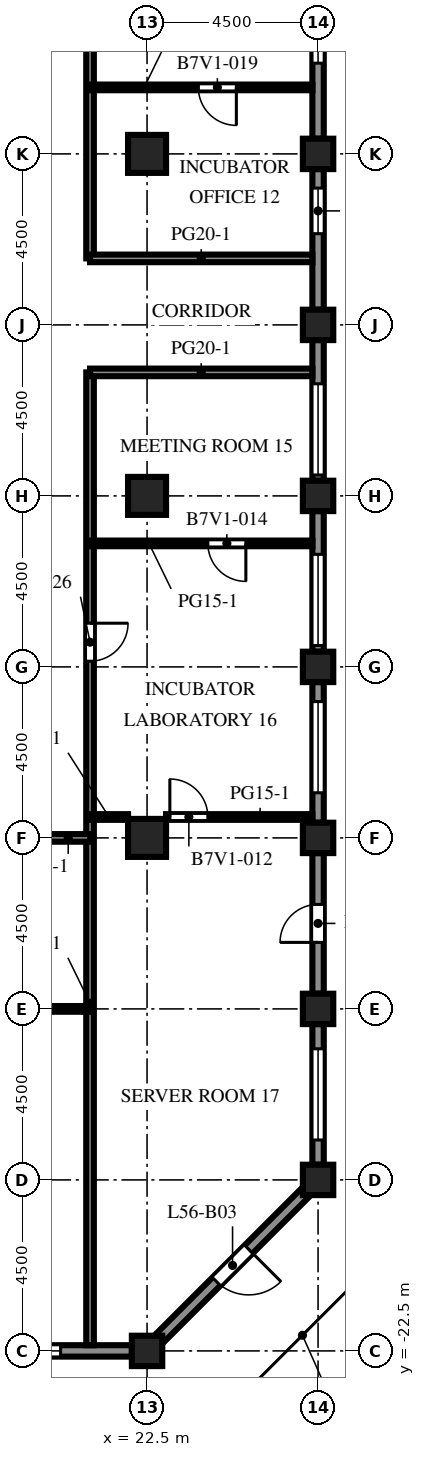
"""IFC4 building model, lengths in metres.
Left out: names, types, materials, properties, quantities, classifications, styles, units other than length and angle.
Written with IfcOpenShell. Run it as: python <this file> out.ifc"""

import sys

from ifc_helpers import new_model, si_unit, direction, frame, frame_2d, origin, origin_2d, place, context, subcontext, project, spatial, rectangle, extrude, element, fill, save


model = new_model("IFC4")
c1 = context("Model", 3, precision=1e-05, world=origin(), true_north=direction((0.0, 1.0)))
c2 = subcontext(c1, "Body", "Model", "MODEL_VIEW")
j1 = project(units=[si_unit("LENGTHUNIT", "METRE"), si_unit("PLANEANGLEUNIT", "RADIAN")], contexts=[c1])
p1 = place(None, origin())
s1 = spatial("IfcSite", under=j1, at=p1, CompositionType="ELEMENT")
p2 = place(p1, origin())
s2 = spatial("IfcBuilding", under=s1, at=p2, CompositionType="ELEMENT")
p3 = place(p2, frame((0.0, 0.0, 248.0)))
s3 = spatial("IfcBuildingStorey", under=s2, at=p3, CompositionType="ELEMENT", Elevation=248.0)
for number, where, z_axis, x_axis in (
    (1, (22.5, -22.5, 0.0), (0.0, 0.0, 1.0), (1.0, 0.0, 0.0)),
    (2, (27.0, -18.0, 0.0), (0.0, 0.0, 1.0), (1.0, 0.0, 0.0)),
    (3, (27.0, -13.5, 0.0), (0.0, 0.0, 1.0), (1.0, 0.0, 0.0)),
    (4, (27.0, -9.0, 0.0), (0.0, 0.0, 1.0), (1.0, 0.0, 0.0)),
    (5, (27.0, -4.5, 0.0), (0.0, 0.0, 1.0), (1.0, 0.0, 0.0)),
    (6, (27.0, 0.0, 0.0), (0.0, 0.0, 1.0), (1.0, 0.0, 0.0)),
    (7, (27.0, 4.5, 0.0), (0.0, 0.0, 1.0), (1.0, 0.0, 0.0)),
    (8, (27.0, 9.0, 0.0), (0.0, 0.0, 1.0), (1.0, 0.0, 0.0)),
):
    element("IfcColumn", number, at=place(p3, frame(where, z_axis=z_axis, x_axis=x_axis)), inside=s3, PredefinedType="COLUMN", context=c2, shape_type="SweptSolid", body=[
        extrude(rectangle(XDim=0.8, YDim=0.8, at=origin_2d()), origin(), (0.0, 0.0, 1.0), 4.1),
    ])
for number, where, z_axis, x_axis in (
    (9, (22.5, -9.0, 0.0), (0.0, 0.0, 1.0), (1.0, 0.0, 0.0)),
    (10, (22.5, 0.0, 0.0), (0.0, 0.0, 1.0), (1.0, 0.0, 0.0)),
    (11, (22.5, 9.0, 0.0), (0.0, 0.0, 1.0), (1.0, 0.0, 0.0)),
):
    element("IfcColumn", number, at=place(p3, frame(where, z_axis=z_axis, x_axis=x_axis)), inside=s3, PredefinedType="COLUMN", context=c2, shape_type="SweptSolid", body=[
        extrude(rectangle(XDim=1.0, YDim=1.0, at=origin_2d()), origin(), (0.0, 0.0, 1.0), 4.1),
    ])
p4 = place(p3, frame((22.1, -22.5, 0.0), z_axis=(0.0, 0.0, 1.0), x_axis=(-1.0, 0.0, 0.0)))
e12 = element("IfcWall", 12, at=p4, inside=s3, PredefinedType="SOLIDWALL", context=c2, shape_type="SweptSolid", body=[
    extrude(rectangle(XDim=3.7, YDim=0.3, at=frame_2d((1.85, 0.0))), origin(), (0.0, 0.0, 1.0), 2.85),
])
p5 = place(p4, frame((1.875, 0.0, 0.8)))
e13 = element("IfcOpeningElement", 13, at=p5, cuts=e12, PredefinedType="OPENING", context=c2, shape_type="SweptSolid", body=[
    extrude(rectangle(XDim=1.2, YDim=1.7, at=frame_2d((0.6, 0.85))), frame((0.0, 0.16, 0.0), z_axis=(0.0, -1.0, 0.0), x_axis=(1.0, 0.0, 0.0)), (0.0, 0.0, 1.0), 0.32),
])
p6 = place(p3, frame((26.706, -18.294, 0.0), z_axis=(0.0, 0.0, 1.0), x_axis=(-0.707106781187, -0.707106781187, 0.0)))
e14 = element("IfcWall", 14, at=p6, inside=s3, PredefinedType="SOLIDWALL", context=c2, shape_type="SweptSolid", body=[
    extrude(rectangle(XDim=5.532, YDim=0.3, at=frame_2d((2.766, 0.0))), origin(), (0.0, 0.0, 1.0), 2.85),
])
p7 = place(p6, frame((2.166, 0.0, 0.0)))
e15 = element("IfcOpeningElement", 15, at=p7, cuts=e14, PredefinedType="OPENING", context=c2, shape_type="SweptSolid", body=[
    extrude(rectangle(XDim=1.2, YDim=2.2, at=frame_2d((0.6, 1.1))), frame((0.0, 0.16, 0.0), z_axis=(0.0, -1.0, 0.0), x_axis=(1.0, 0.0, 0.0)), (0.0, 0.0, 1.0), 0.32),
])
p8 = place(p3, frame((27.0, -13.9, 0.0), z_axis=(0.0, 0.0, 1.0), x_axis=(0.0, -1.0, 0.0)))
e16 = element("IfcWall", 16, at=p8, inside=s3, PredefinedType="SOLIDWALL", context=c2, shape_type="SweptSolid", body=[
    extrude(rectangle(XDim=3.7, YDim=0.3, at=frame_2d((1.85, 0.0))), origin(), (0.0, 0.0, 1.0), 2.85),
])
p9 = place(p8, frame((0.65, 0.0, 0.8)))
e17 = element("IfcOpeningElement", 17, at=p9, cuts=e16, PredefinedType="OPENING", context=c2, shape_type="SweptSolid", body=[
    extrude(rectangle(XDim=2.4, YDim=1.7, at=frame_2d((1.2, 0.85))), frame((0.0, 0.16, 0.0), z_axis=(0.0, -1.0, 0.0), x_axis=(1.0, 0.0, 0.0)), (0.0, 0.0, 1.0), 0.32),
])
p10 = place(p3, frame((27.0, -9.4, 0.0), z_axis=(0.0, 0.0, 1.0), x_axis=(0.0, -1.0, 0.0)))
e18 = element("IfcWall", 18, at=p10, inside=s3, PredefinedType="SOLIDWALL", context=c2, shape_type="SweptSolid", body=[
    extrude(rectangle(XDim=3.7, YDim=0.3, at=frame_2d((1.85, 0.0))), origin(), (0.0, 0.0, 1.0), 2.85),
])
p11 = place(p10, frame((1.35, 0.0, 0.0)))
e19 = element("IfcOpeningElement", 19, at=p11, cuts=e18, PredefinedType="OPENING", context=c2, shape_type="SweptSolid", body=[
    extrude(rectangle(XDim=1.0, YDim=2.2, at=frame_2d((0.5, 1.1))), frame((0.0, 0.16, 0.0), z_axis=(0.0, -1.0, 0.0), x_axis=(1.0, 0.0, 0.0)), (0.0, 0.0, 1.0), 0.32),
])
p12 = place(p3, frame((27.0, -4.9, 0.0), z_axis=(0.0, 0.0, 1.0), x_axis=(0.0, -1.0, 0.0)))
e20 = element("IfcWall", 20, at=p12, inside=s3, PredefinedType="SOLIDWALL", context=c2, shape_type="SweptSolid", body=[
    extrude(rectangle(XDim=3.7, YDim=0.3, at=frame_2d((1.85, 0.0))), origin(), (0.0, 0.0, 1.0), 2.85),
])
p13 = place(p12, frame((0.512, 0.0, 0.8)))
e21 = element("IfcOpeningElement", 21, at=p13, cuts=e20, PredefinedType="OPENING", context=c2, shape_type="SweptSolid", body=[
    extrude(rectangle(XDim=2.4, YDim=1.7, at=frame_2d((1.2, 0.85))), frame((0.0, 0.16, 0.0), z_axis=(0.0, -1.0, 0.0), x_axis=(1.0, 0.0, 0.0)), (0.0, 0.0, 1.0), 0.32),
])
p14 = place(p3, frame((27.0, -0.4, 0.0), z_axis=(0.0, 0.0, 1.0), x_axis=(0.0, -1.0, 0.0)))
e22 = element("IfcWall", 22, at=p14, inside=s3, PredefinedType="SOLIDWALL", context=c2, shape_type="SweptSolid", body=[
    extrude(rectangle(XDim=3.7, YDim=0.3, at=frame_2d((1.85, 0.0))), origin(), (0.0, 0.0, 1.0), 2.85),
])
p15 = place(p14, frame((1.137, 0.0, 0.8)))
e23 = element("IfcOpeningElement", 23, at=p15, cuts=e22, PredefinedType="OPENING", context=c2, shape_type="SweptSolid", body=[
    extrude(rectangle(XDim=2.4, YDim=1.7, at=frame_2d((1.2, 0.85))), frame((0.0, 0.16, 0.0), z_axis=(0.0, -1.0, 0.0), x_axis=(1.0, 0.0, 0.0)), (0.0, 0.0, 1.0), 0.32),
])
p16 = place(p3, frame((27.0, 4.1, 0.0), z_axis=(0.0, 0.0, 1.0), x_axis=(0.0, -1.0, 0.0)))
e24 = element("IfcWall", 24, at=p16, inside=s3, PredefinedType="SOLIDWALL", context=c2, shape_type="SweptSolid", body=[
    extrude(rectangle(XDim=3.7, YDim=0.3, at=frame_2d((1.85, 0.0))), origin(), (0.0, 0.0, 1.0), 2.85),
])
p17 = place(p16, frame((1.15, 0.0, 0.8)))
e25 = element("IfcOpeningElement", 25, at=p17, cuts=e24, PredefinedType="OPENING", context=c2, shape_type="SweptSolid", body=[
    extrude(rectangle(XDim=2.4, YDim=1.7, at=frame_2d((1.2, 0.85))), frame((0.0, 0.16, 0.0), z_axis=(0.0, -1.0, 0.0), x_axis=(1.0, 0.0, 0.0)), (0.0, 0.0, 1.0), 0.32),
])
p18 = place(p3, frame((27.0, 8.6, 0.0), z_axis=(0.0, 0.0, 1.0), x_axis=(0.0, -1.0, 0.0)))
e26 = element("IfcWall", 26, at=p18, inside=s3, PredefinedType="SOLIDWALL", context=c2, shape_type="SweptSolid", body=[
    extrude(rectangle(XDim=3.7, YDim=0.3, at=frame_2d((1.85, 0.0))), origin(), (0.0, 0.0, 1.0), 2.85),
])
p19 = place(p18, frame((0.5, 0.0, 0.8)))
e27 = element("IfcOpeningElement", 27, at=p19, cuts=e26, PredefinedType="OPENING", context=c2, shape_type="SweptSolid", body=[
    extrude(rectangle(XDim=1.2, YDim=1.7, at=frame_2d((0.6, 0.85))), frame((0.0, 0.16, 0.0), z_axis=(0.0, -1.0, 0.0), x_axis=(1.0, 0.0, 0.0)), (0.0, 0.0, 1.0), 0.32),
])
p20 = place(p3, frame((27.0, 13.1, 0.0), z_axis=(0.0, 0.0, 1.0), x_axis=(0.0, -1.0, 0.0)))
e28 = element("IfcWall", 28, at=p20, inside=s3, PredefinedType="SOLIDWALL", context=c2, shape_type="SweptSolid", body=[
    extrude(rectangle(XDim=3.7, YDim=0.3, at=frame_2d((1.85, 0.0))), origin(), (0.0, 0.0, 1.0), 2.85),
])
p21 = place(p20, frame((0.512, 0.0, 0.8)))
e29 = element("IfcOpeningElement", 29, at=p21, cuts=e28, PredefinedType="OPENING", context=c2, shape_type="SweptSolid", body=[
    extrude(rectangle(XDim=1.2, YDim=1.7, at=frame_2d((0.6, 0.85))), frame((0.0, 0.16, 0.0), z_axis=(0.0, -1.0, 0.0), x_axis=(1.0, 0.0, 0.0)), (0.0, 0.0, 1.0), 0.32),
])
p22 = place(p3, frame((21.0, 3.25, 0.0), z_axis=(0.0, 0.0, 1.0), x_axis=(0.0, -1.0, 0.0)))
e30 = element("IfcWall", 30, at=p22, inside=s3, PredefinedType="PARTITIONING", context=c2, shape_type="SweptSolid", body=[
    extrude(rectangle(XDim=25.6, YDim=0.2, at=frame_2d((12.8, 0.0))), origin(), (0.0, 0.0, 1.0), 3.65),
])
p23 = place(p22, frame((6.6, 0.0, 0.0)))
e31 = element("IfcOpeningElement", 31, at=p23, cuts=e30, PredefinedType="OPENING", context=c2, shape_type="SweptSolid", body=[
    extrude(rectangle(XDim=1.0, YDim=2.1, at=frame_2d((0.5, 1.05))), frame((0.0, 0.11, 0.0), z_axis=(0.0, -1.0, 0.0), x_axis=(1.0, 0.0, 0.0)), (0.0, 0.0, 1.0), 0.22),
])
p24 = place(p3, frame((21.0, 31.35, 0.0), z_axis=(0.0, 0.0, 1.0), x_axis=(0.0, -1.0, 0.0)))
e32 = element("IfcWall", 32, at=p24, inside=s3, PredefinedType="PARTITIONING", context=c2, shape_type="SweptSolid", body=[
    extrude(rectangle(XDim=25.1, YDim=0.2, at=frame_2d((12.55, 0.0))), origin(), (0.0, 0.0, 1.0), 3.65),
])
p25 = place(p24, frame((15.5, 0.0, 0.0)))
e33 = element("IfcOpeningElement", 33, at=p25, cuts=e32, PredefinedType="OPENING", context=c2, shape_type="SweptSolid", body=[
    extrude(rectangle(XDim=1.0, YDim=2.1, at=frame_2d((0.5, 1.05))), frame((0.0, 0.11, 0.0), z_axis=(0.0, -1.0, 0.0), x_axis=(1.0, 0.0, 0.0)), (0.0, 0.0, 1.0), 0.22),
])
p26 = place(p3, frame((21.0, -13.5, 0.0), z_axis=(0.0, 0.0, 1.0), x_axis=(-1.0, 0.0, 0.0)))
e34 = element("IfcWall", 34, at=p26, inside=s3, PredefinedType="PARTITIONING", context=c2, shape_type="SweptSolid", body=[
    extrude(rectangle(XDim=34.5, YDim=0.15, at=frame_2d((17.25, 0.0))), origin(), (0.0, 0.0, 1.0), 3.65),
])
p27 = place(p26, frame((31.65, 0.0, 0.0)))
e35 = element("IfcOpeningElement", 35, at=p27, cuts=e34, PredefinedType="OPENING", context=c2, shape_type="SweptSolid", body=[
    extrude(rectangle(XDim=1.0, YDim=2.1, at=frame_2d((0.5, 1.05))), frame((0.0, 0.085, 0.0), z_axis=(0.0, -1.0, 0.0), x_axis=(1.0, 0.0, 0.0)), (0.0, 0.0, 1.0), 0.17),
])
p28 = place(p26, frame((22.15, 0.0, 0.0)))
e36 = element("IfcOpeningElement", 36, at=p28, cuts=e34, PredefinedType="OPENING", context=c2, shape_type="SweptSolid", body=[
    extrude(rectangle(XDim=1.0, YDim=2.1, at=frame_2d((0.5, 1.05))), frame((0.0, 0.085, 0.0), z_axis=(0.0, -1.0, 0.0), x_axis=(1.0, 0.0, 0.0)), (0.0, 0.0, 1.0), 0.17),
])
p29 = place(p26, frame((13.15, 0.0, 0.0)))
e37 = element("IfcOpeningElement", 37, at=p29, cuts=e34, PredefinedType="OPENING", context=c2, shape_type="SweptSolid", body=[
    extrude(rectangle(XDim=1.0, YDim=2.1, at=frame_2d((0.5, 1.05))), frame((0.0, 0.085, 0.0), z_axis=(0.0, -1.0, 0.0), x_axis=(1.0, 0.0, 0.0)), (0.0, 0.0, 1.0), 0.17),
])
p30 = place(p26, frame((6.15, 0.0, 0.0)))
e38 = element("IfcOpeningElement", 38, at=p30, cuts=e34, PredefinedType="OPENING", context=c2, shape_type="SweptSolid", body=[
    extrude(rectangle(XDim=1.0, YDim=2.1, at=frame_2d((0.5, 1.05))), frame((0.0, 0.085, 0.0), z_axis=(0.0, -1.0, 0.0), x_axis=(1.0, 0.0, 0.0)), (0.0, 0.0, 1.0), 0.17),
])
p31 = place(p3, frame((21.0, -9.0, 0.0), z_axis=(0.0, 0.0, 1.0), x_axis=(-1.0, 0.0, 0.0)))
e39 = element("IfcWall", 39, at=p31, inside=s3, PredefinedType="PARTITIONING", context=c2, shape_type="SweptSolid", body=[
    extrude(rectangle(XDim=3.0, YDim=0.2, at=frame_2d((1.5, 0.0))), origin(), (0.0, 0.0, 1.0), 3.65),
])
p32 = place(p31, frame((1.15, 0.0, 0.0)))
e40 = element("IfcOpeningElement", 40, at=p32, cuts=e39, PredefinedType="OPENING", context=c2, shape_type="SweptSolid", body=[
    extrude(rectangle(XDim=1.0, YDim=2.1, at=frame_2d((0.5, 1.05))), frame((0.0, 0.11, 0.0), z_axis=(0.0, -1.0, 0.0), x_axis=(1.0, 0.0, 0.0)), (0.0, 0.0, 1.0), 0.22),
])
p33 = place(p3, frame((21.0, -8.45, 0.0), z_axis=(0.0, 0.0, 1.0), x_axis=(1.0, 0.0, 0.0)))
e41 = element("IfcWall", 41, at=p33, inside=s3, PredefinedType="PARTITIONING", context=c2, shape_type="SweptSolid", body=[
    extrude(rectangle(XDim=1.0, YDim=0.15, at=frame_2d((0.5, 0.0))), origin(), (0.0, 0.0, 1.0), 3.65),
])
p34 = place(p3, frame((26.85, -8.45, 0.0), z_axis=(0.0, 0.0, 1.0), x_axis=(-1.0, 0.0, 0.0)))
e42 = element("IfcWall", 42, at=p34, inside=s3, PredefinedType="PARTITIONING", context=c2, shape_type="SweptSolid", body=[
    extrude(rectangle(XDim=3.85, YDim=0.15, at=frame_2d((1.925, 0.0))), origin(), (0.0, 0.0, 1.0), 3.65),
])
p35 = place(p34, frame((2.75, 0.0, 0.0)))
e43 = element("IfcOpeningElement", 43, at=p35, cuts=e42, PredefinedType="OPENING", context=c2, shape_type="SweptSolid", body=[
    extrude(rectangle(XDim=1.0, YDim=2.1, at=frame_2d((0.5, 1.05))), frame((0.0, 0.085, 0.0), z_axis=(0.0, -1.0, 0.0), x_axis=(1.0, 0.0, 0.0)), (0.0, 0.0, 1.0), 0.17),
])
p36 = place(p3, frame((21.0, -1.25, 0.0), z_axis=(0.0, 0.0, 1.0), x_axis=(1.0, 0.0, 0.0)))
e44 = element("IfcWall", 44, at=p36, inside=s3, PredefinedType="PARTITIONING", context=c2, shape_type="SweptSolid", body=[
    extrude(rectangle(XDim=5.85, YDim=0.15, at=frame_2d((2.925, 0.0))), origin(), (0.0, 0.0, 1.0), 3.65),
])
p37 = place(p36, frame((3.1, 0.0, 0.0)))
e45 = element("IfcOpeningElement", 45, at=p37, cuts=e44, PredefinedType="OPENING", context=c2, shape_type="SweptSolid", body=[
    extrude(rectangle(XDim=1.0, YDim=2.1, at=frame_2d((0.5, 1.05))), frame((0.0, 0.085, 0.0), z_axis=(0.0, -1.0, 0.0), x_axis=(1.0, 0.0, 0.0)), (0.0, 0.0, 1.0), 0.17),
])
for number, where, z_axis, x_axis in (
    (46, (21.0, 3.25, 0.0), (0.0, 0.0, 1.0), (1.0, 0.0, 0.0)),
    (47, (21.0, 6.25, 0.0), (0.0, 0.0, 1.0), (1.0, 0.0, 0.0)),
):
    element("IfcWall", number, at=place(p3, frame(where, z_axis=z_axis, x_axis=x_axis)), inside=s3, PredefinedType="PARTITIONING", context=c2, shape_type="SweptSolid", body=[
        extrude(rectangle(XDim=5.85, YDim=0.2, at=frame_2d((2.925, 0.0))), origin(), (0.0, 0.0, 1.0), 3.65),
    ])
p38 = place(p3, frame((26.85, 10.75, 0.0), z_axis=(0.0, 0.0, 1.0), x_axis=(-1.0, 0.0, 0.0)))
e48 = element("IfcWall", 48, at=p38, inside=s3, PredefinedType="PARTITIONING", context=c2, shape_type="SweptSolid", body=[
    extrude(rectangle(XDim=5.85, YDim=0.15, at=frame_2d((2.925, 0.0))), origin(), (0.0, 0.0, 1.0), 3.65),
])
p39 = place(p38, frame((2.0, 0.0, 0.0)))
e49 = element("IfcOpeningElement", 49, at=p39, cuts=e48, PredefinedType="OPENING", context=c2, shape_type="SweptSolid", body=[
    extrude(rectangle(XDim=1.0, YDim=2.1, at=frame_2d((0.5, 1.05))), frame((0.0, 0.085, 0.0), z_axis=(0.0, -1.0, 0.0), x_axis=(1.0, 0.0, 0.0)), (0.0, 0.0, 1.0), 0.17),
])
p40 = place(p5, origin())
e50 = element("IfcWindow", 50, at=p40, inside=s3, PartitioningType="SINGLE_PANEL", PredefinedType="WINDOW", context=c2, shape_type="SweptSolid", body=[
    extrude(rectangle(XDim=1.2, YDim=1.7, at=frame_2d((0.6, 0.85))), frame((0.0, 0.03, 0.0), z_axis=(0.0, -1.0, 0.0), x_axis=(1.0, 0.0, 0.0)), (0.0, 0.0, 1.0), 0.06),
])
fill(e13, e50)
p41 = place(p7, origin())
e51 = element("IfcDoor", 51, at=p41, inside=s3, OperationType="SINGLE_SWING_LEFT", PredefinedType="DOOR", context=c2, shape_type="SweptSolid", body=[
    extrude(rectangle(XDim=1.2, YDim=2.2, at=frame_2d((0.6, 1.1))), frame((0.0, 0.025, 0.0), z_axis=(0.0, -1.0, 0.0), x_axis=(1.0, 0.0, 0.0)), (0.0, 0.0, 1.0), 0.05),
])
fill(e15, e51)
p42 = place(p9, origin())
e52 = element("IfcWindow", 52, at=p42, inside=s3, PartitioningType="SINGLE_PANEL", PredefinedType="WINDOW", context=c2, shape_type="SweptSolid", body=[
    extrude(rectangle(XDim=2.4, YDim=1.7, at=frame_2d((1.2, 0.85))), frame((0.0, 0.03, 0.0), z_axis=(0.0, -1.0, 0.0), x_axis=(1.0, 0.0, 0.0)), (0.0, 0.0, 1.0), 0.06),
])
fill(e17, e52)
p43 = place(p11, origin())
e53 = element("IfcDoor", 53, at=p43, inside=s3, OperationType="SINGLE_SWING_RIGHT", PredefinedType="DOOR", context=c2, shape_type="SweptSolid", body=[
    extrude(rectangle(XDim=1.0, YDim=2.2, at=frame_2d((0.5, 1.1))), frame((0.0, 0.025, 0.0), z_axis=(0.0, -1.0, 0.0), x_axis=(1.0, 0.0, 0.0)), (0.0, 0.0, 1.0), 0.05),
])
fill(e19, e53)
p44 = place(p13, origin())
e54 = element("IfcWindow", 54, at=p44, inside=s3, PartitioningType="SINGLE_PANEL", PredefinedType="WINDOW", context=c2, shape_type="SweptSolid", body=[
    extrude(rectangle(XDim=2.4, YDim=1.7, at=frame_2d((1.2, 0.85))), frame((0.0, 0.03, 0.0), z_axis=(0.0, -1.0, 0.0), x_axis=(1.0, 0.0, 0.0)), (0.0, 0.0, 1.0), 0.06),
])
fill(e21, e54)
p45 = place(p15, origin())
e55 = element("IfcWindow", 55, at=p45, inside=s3, PartitioningType="SINGLE_PANEL", PredefinedType="WINDOW", context=c2, shape_type="SweptSolid", body=[
    extrude(rectangle(XDim=2.4, YDim=1.7, at=frame_2d((1.2, 0.85))), frame((0.0, 0.03, 0.0), z_axis=(0.0, -1.0, 0.0), x_axis=(1.0, 0.0, 0.0)), (0.0, 0.0, 1.0), 0.06),
])
fill(e23, e55)
p46 = place(p17, origin())
e56 = element("IfcWindow", 56, at=p46, inside=s3, PartitioningType="SINGLE_PANEL", PredefinedType="WINDOW", context=c2, shape_type="SweptSolid", body=[
    extrude(rectangle(XDim=2.4, YDim=1.7, at=frame_2d((1.2, 0.85))), frame((0.0, 0.03, 0.0), z_axis=(0.0, -1.0, 0.0), x_axis=(1.0, 0.0, 0.0)), (0.0, 0.0, 1.0), 0.06),
])
fill(e25, e56)
p47 = place(p19, origin())
e57 = element("IfcWindow", 57, at=p47, inside=s3, PartitioningType="SINGLE_PANEL", PredefinedType="WINDOW", context=c2, shape_type="SweptSolid", body=[
    extrude(rectangle(XDim=1.2, YDim=1.7, at=frame_2d((0.6, 0.85))), frame((0.0, 0.03, 0.0), z_axis=(0.0, -1.0, 0.0), x_axis=(1.0, 0.0, 0.0)), (0.0, 0.0, 1.0), 0.06),
])
fill(e27, e57)
p48 = place(p21, origin())
e58 = element("IfcWindow", 58, at=p48, inside=s3, PartitioningType="SINGLE_PANEL", PredefinedType="WINDOW", context=c2, shape_type="SweptSolid", body=[
    extrude(rectangle(XDim=1.2, YDim=1.7, at=frame_2d((0.6, 0.85))), frame((0.0, 0.03, 0.0), z_axis=(0.0, -1.0, 0.0), x_axis=(1.0, 0.0, 0.0)), (0.0, 0.0, 1.0), 0.06),
])
fill(e29, e58)
p49 = place(p35, origin())
e59 = element("IfcDoor", 59, at=p49, inside=s3, OperationType="SINGLE_SWING_RIGHT", PredefinedType="DOOR", context=c2, shape_type="SweptSolid", body=[
    extrude(rectangle(XDim=1.0, YDim=2.1, at=frame_2d((0.5, 1.05))), frame((0.0, 0.025, 0.0), z_axis=(0.0, -1.0, 0.0), x_axis=(1.0, 0.0, 0.0)), (0.0, 0.0, 1.0), 0.05),
])
fill(e43, e59)
p50 = place(p37, origin())
e60 = element("IfcDoor", 60, at=p50, inside=s3, OperationType="SINGLE_SWING_RIGHT", PredefinedType="DOOR", context=c2, shape_type="SweptSolid", body=[
    extrude(rectangle(XDim=1.0, YDim=2.1, at=frame_2d((0.5, 1.05))), frame((0.0, 0.025, 0.0), z_axis=(0.0, -1.0, 0.0), x_axis=(1.0, 0.0, 0.0)), (0.0, 0.0, 1.0), 0.05),
])
fill(e45, e60)
p51 = place(p39, origin())
e61 = element("IfcDoor", 61, at=p51, inside=s3, OperationType="SINGLE_SWING_LEFT", PredefinedType="DOOR", context=c2, shape_type="SweptSolid", body=[
    extrude(rectangle(XDim=1.0, YDim=2.1, at=frame_2d((0.5, 1.05))), frame((0.0, 0.025, 0.0), z_axis=(0.0, -1.0, 0.0), x_axis=(1.0, 0.0, 0.0)), (0.0, 0.0, 1.0), 0.05),
])
fill(e49, e61)
p52 = place(p23, origin())
e62 = element("IfcDoor", 62, at=p52, inside=s3, OperationType="SINGLE_SWING_LEFT", PredefinedType="DOOR", context=c2, shape_type="SweptSolid", body=[
    extrude(rectangle(XDim=1.0, YDim=2.1, at=frame_2d((0.5, 1.05))), frame((0.0, 0.025, 0.0), z_axis=(0.0, -1.0, 0.0), x_axis=(1.0, 0.0, 0.0)), (0.0, 0.0, 1.0), 0.05),
])
fill(e31, e62)
save(model, sys.argv[1])
